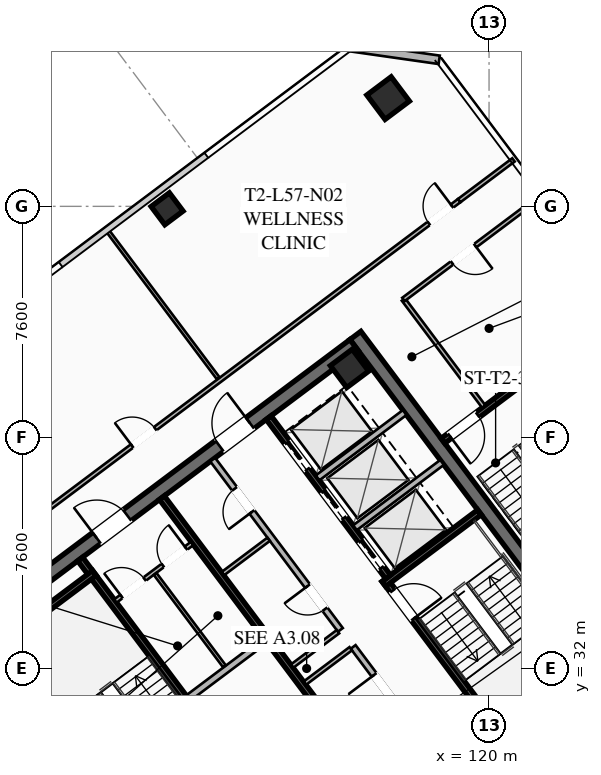
"""IFC4 building model, lengths in metres.
Left out: names, types, materials, properties, quantities, classifications, styles, units other than length and angle.
Written with IfcOpenShell. Run it as: python <this file> out.ifc"""

import sys

from ifc_helpers import new_model, si_unit, direction, frame, frame_2d, origin, origin_2d, place, context, subcontext, project, spatial, rectangle, hollow_rectangle, extrude, element, fill, save


model = new_model("IFC4")
c1 = context("Model", 3, precision=1e-05, world=origin(), true_north=direction((0.0, 1.0)))
c2 = subcontext(c1, "Body", "Model", "MODEL_VIEW")
j1 = project(units=[si_unit("LENGTHUNIT", "METRE"), si_unit("PLANEANGLEUNIT", "RADIAN")], contexts=[c1])
p1 = place(None, origin())
s1 = spatial("IfcSite", under=j1, at=p1, CompositionType="ELEMENT")
p2 = place(p1, origin())
s2 = spatial("IfcBuilding", under=s1, at=p2, CompositionType="ELEMENT")
p3 = place(p2, frame((0.0, 0.0, 211.3)))
s3 = spatial("IfcBuildingStorey", under=s2, at=p3, CompositionType="ELEMENT", Elevation=211.3)
for number, where, z_axis, x_axis in (
    (1, (112.396, 21.047, 0.0), (0.0, 0.0, 1.0), (-0.6, 0.8, 0.0)),
    (2, (115.604, 42.953, 0.0), (0.0, 0.0, 1.0), (0.6, -0.8, 0.0)),
):
    element("IfcWall", number, at=place(p3, frame(where, z_axis=z_axis, x_axis=x_axis)), inside=s3, PredefinedType="SHEAR", context=c2, shape_type="SweptSolid", body=[
        extrude(rectangle(XDim=15.6, YDim=0.45, at=frame_2d((7.8, 0.0))), origin(), (0.0, 0.0, 1.0), 3.55),
    ])
p4 = place(p3, frame((103.351, 33.482, 0.0), z_axis=(0.0, 0.0, 1.0), x_axis=(0.8, 0.6, 0.0)))
e3 = element("IfcWall", 3, at=p4, inside=s3, PredefinedType="SHEAR", context=c2, shape_type="SweptSolid", body=[
    extrude(rectangle(XDim=15.26, YDim=0.45, at=frame_2d((7.63, 0.0))), origin(), (0.0, 0.0, 1.0), 3.55),
])
p5 = place(p4, frame((4.68, 0.0, 0.0)))
e4 = element("IfcOpeningElement", 4, at=p5, cuts=e3, PredefinedType="OPENING", context=c2, shape_type="SweptSolid", body=[
    extrude(rectangle(XDim=1.25, YDim=2.25, at=frame_2d((0.625, 1.125))), frame((0.0, 0.235, 0.0), z_axis=(0.0, -1.0, 0.0), x_axis=(1.0, 0.0, 0.0)), (0.0, 0.0, 1.0), 0.47),
])
p6 = place(p4, frame((9.73, 0.0, 0.0)))
e5 = element("IfcOpeningElement", 5, at=p6, cuts=e3, PredefinedType="OPENING", context=c2, shape_type="SweptSolid", body=[
    extrude(rectangle(XDim=1.25, YDim=2.25, at=frame_2d((0.625, 1.125))), frame((0.0, 0.235, 0.0), z_axis=(0.0, -1.0, 0.0), x_axis=(1.0, 0.0, 0.0)), (0.0, 0.0, 1.0), 0.47),
])
p7 = place(p3, frame((115.41, 41.87, 0.0), z_axis=(0.0, 0.0, 1.0), x_axis=(0.799999996291, 0.600000004945, 0.0)))
e6 = element("IfcColumn", 6, at=p7, inside=s3, PredefinedType="COLUMN", context=c2, shape_type="SweptSolid", body=[
    extrude(hollow_rectangle(XDim=0.9, YDim=0.9, WallThickness=0.04, at=origin_2d()), origin(), (0.0, 0.0, 1.0), 3.37),
])
p8 = place(p3, frame((116.68, 50.76, 0.0), z_axis=(0.0, 0.0, 1.0), x_axis=(0.799999996291, 0.600000004945, 0.0)))
e7 = element("IfcColumn", 7, at=p8, inside=s3, PredefinedType="COLUMN", context=c2, shape_type="SweptSolid", body=[
    extrude(hollow_rectangle(XDim=1.0, YDim=1.0, WallThickness=0.04, at=origin_2d()), origin(), (0.0, 0.0, 1.0), 3.37),
])
p9 = place(p3, frame((109.41, 47.12, 0.0), z_axis=(0.0, 0.0, 1.0), x_axis=(0.799999996291, 0.600000004945, 0.0)))
e8 = element("IfcColumn", 8, at=p9, inside=s3, PredefinedType="COLUMN", context=c2, shape_type="SweptSolid", body=[
    extrude(hollow_rectangle(XDim=0.75, YDim=0.75, WallThickness=0.032, at=origin_2d()), origin(), (0.0, 0.0, 1.0), 3.37),
])
p10 = place(p3, frame((115.42, 52.44, 0.0), z_axis=(0.0, 0.0, 1.0), x_axis=(0.989954425158, -0.14138683146, 0.0)))
e9 = element("IfcWall", 9, at=p10, inside=s3, PredefinedType="SOLIDWALL", context=c2, shape_type="SweptSolid", body=[
    extrude(rectangle(XDim=2.97, YDim=0.28, at=frame_2d((1.485, 0.0))), origin(), (0.0, 0.0, 1.0), 3.37),
])
p11 = place(p3, frame((111.44, 29.08, 0.0), z_axis=(0.0, 0.0, 1.0), x_axis=(-0.59999041401, 0.800007189403, 0.0)))
e10 = element("IfcWall", 10, at=p11, inside=s3, PredefinedType="SHEAR", context=c2, shape_type="SweptSolid", body=[
    extrude(rectangle(XDim=8.15, YDim=0.2, at=frame_2d((4.075, 0.0))), origin(), (0.0, 0.0, 1.0), 3.37),
])
p12 = place(p11, frame((0.45, 0.0, 0.0)))
e11 = element("IfcOpeningElement", 11, at=p12, cuts=e10, PredefinedType="OPENING", context=c2, shape_type="SweptSolid", body=[
    extrude(rectangle(XDim=1.15, YDim=2.2, at=frame_2d((0.575, 1.1))), frame((0.0, 0.11, 0.0), z_axis=(0.0, -1.0, 0.0), x_axis=(1.0, 0.0, 0.0)), (0.0, 0.0, 1.0), 0.22),
])
p13 = place(p3, frame((103.876, 32.782, 0.0), z_axis=(0.0, 0.0, 1.0), x_axis=(0.800014909178, 0.599980120581, 0.0)))
e12 = element("IfcWall", 12, at=p13, inside=s3, PredefinedType="SHEAR", context=c2, shape_type="SweptSolid", body=[
    extrude(rectangle(XDim=3.93, YDim=0.2, at=frame_2d((1.965, 0.0))), origin(), (0.0, 0.0, 1.0), 3.37),
])
p14 = place(p3, frame((116.56, 34.92, 0.0), z_axis=(0.0, 0.0, 1.0), x_axis=(0.59999041401, -0.800007189403, 0.0)))
e13 = element("IfcWall", 13, at=p14, inside=s3, PredefinedType="SHEAR", context=c2, shape_type="SweptSolid", body=[
    extrude(rectangle(XDim=8.15, YDim=0.2, at=frame_2d((4.075, 0.0))), origin(), (0.0, 0.0, 1.0), 3.37),
])
p15 = place(p14, frame((0.45, 0.0, 0.0)))
e14 = element("IfcOpeningElement", 14, at=p15, cuts=e13, PredefinedType="OPENING", context=c2, shape_type="SweptSolid", body=[
    extrude(rectangle(XDim=1.15, YDim=2.2, at=frame_2d((0.575, 1.1))), frame((0.0, 0.11, 0.0), z_axis=(0.0, -1.0, 0.0), x_axis=(1.0, 0.0, 0.0)), (0.0, 0.0, 1.0), 0.22),
])
for number, where, z_axis, x_axis in (
    (15, (116.54, 34.78, 0.0), (0.0, 0.0, 1.0), (0.8, 0.6, 0.0)),
    (16, (120.98, 28.86, 0.0), (0.0, 0.0, 1.0), (0.8, 0.6, 0.0)),
):
    element("IfcWall", number, at=place(p3, frame(where, z_axis=z_axis, x_axis=x_axis)), inside=s3, PredefinedType="SHEAR", context=c2, shape_type="SweptSolid", body=[
        extrude(rectangle(XDim=3.93, YDim=0.2, at=frame_2d((1.965, 0.0))), origin(), (0.0, 0.0, 1.0), 3.37),
    ])
p16 = place(p3, frame((118.058, 25.856, 0.0), z_axis=(0.0, 0.0, 1.0), x_axis=(-0.600002657301, 0.799998007018, 0.0)))
e17 = element("IfcWall", 17, at=p16, inside=s3, PredefinedType="SHEAR", context=c2, shape_type="SweptSolid", body=[
    extrude(rectangle(XDim=14.7, YDim=0.2, at=frame_2d((7.35, 0.0))), origin(), (0.0, 0.0, 1.0), 3.37),
])
p17 = place(p3, frame((110.104, 31.028, 0.0), z_axis=(0.0, 0.0, 1.0), x_axis=(0.800018601094, 0.59997519774, 0.0)))
e18 = element("IfcWall", 18, at=p17, inside=s3, PredefinedType="SOLIDWALL", context=c2, shape_type="SweptSolid", body=[
    extrude(rectangle(XDim=3.15, YDim=0.22, at=frame_2d((1.575, 0.0))), origin(), (0.0, 0.0, 1.0), 2.723),
])
p18 = place(p3, frame((112.75, 40.25, 0.0), z_axis=(0.0, 0.0, 1.0), x_axis=(0.599994036198, -0.800004472816, 0.0)))
e19 = element("IfcWall", 19, at=p18, inside=s3, PredefinedType="SHEAR", context=c2, shape_type="SweptSolid", body=[
    extrude(rectangle(XDim=6.55, YDim=0.2, at=frame_2d((3.275, 0.0))), origin(), (0.0, 0.0, 1.0), 3.37),
])
p19 = place(p18, frame((5.075, 0.0, 0.0)))
e20 = element("IfcOpeningElement", 20, at=p19, cuts=e19, PredefinedType="OPENING", context=c2, shape_type="SweptSolid", body=[
    extrude(rectangle(XDim=1.1, YDim=2.2, at=frame_2d((0.55, 1.1))), frame((0.0, 0.11, 0.0), z_axis=(0.0, -1.0, 0.0), x_axis=(1.0, 0.0, 0.0)), (0.0, 0.0, 1.0), 0.22),
])
p20 = place(p18, frame((3.025, 0.0, 0.0)))
e21 = element("IfcOpeningElement", 21, at=p20, cuts=e19, PredefinedType="OPENING", context=c2, shape_type="SweptSolid", body=[
    extrude(rectangle(XDim=1.1, YDim=2.2, at=frame_2d((0.55, 1.1))), frame((0.0, 0.11, 0.0), z_axis=(0.0, -1.0, 0.0), x_axis=(1.0, 0.0, 0.0)), (0.0, 0.0, 1.0), 0.22),
])
p21 = place(p18, frame((1.025, 0.0, 0.0)))
e22 = element("IfcOpeningElement", 22, at=p21, cuts=e19, PredefinedType="OPENING", context=c2, shape_type="SweptSolid", body=[
    extrude(rectangle(XDim=1.1, YDim=2.2, at=frame_2d((0.55, 1.1))), frame((0.0, 0.11, 0.0), z_axis=(0.0, -1.0, 0.0), x_axis=(1.0, 0.0, 0.0)), (0.0, 0.0, 1.0), 0.22),
])
for number, where, z_axis, x_axis in (
    (23, (115.59, 36.63, 0.0), (0.0, 0.0, 1.0), (0.8, 0.6, 0.0)),
    (24, (114.36, 38.27, 0.0), (0.0, 0.0, 1.0), (0.8, 0.6, 0.0)),
):
    element("IfcWall", number, at=place(p3, frame(where, z_axis=z_axis, x_axis=x_axis)), inside=s3, PredefinedType="SOLIDWALL", context=c2, shape_type="SweptSolid", body=[
        extrude(rectangle(XDim=3.58, YDim=0.2, at=frame_2d((1.79, 0.0))), origin(), (0.0, 0.0, 1.0), 3.37),
    ])
p22 = place(p3, frame((107.71, 34.22, 0.0), z_axis=(0.0, 0.0, 1.0), x_axis=(0.799981399002, 0.60002480053, 0.0)))
e25 = element("IfcWall", 25, at=p22, inside=s3, PredefinedType="PARTITIONING", context=c2, shape_type="SweptSolid", body=[
    extrude(rectangle(XDim=3.15, YDim=0.135, at=frame_2d((1.575, 0.0))), origin(), (0.0, 0.0, 1.0), 2.723),
])
p23 = place(p22, frame((0.25, 0.0, 0.0)))
e26 = element("IfcOpeningElement", 26, at=p23, cuts=e25, PredefinedType="OPENING", context=c2, shape_type="SweptSolid", body=[
    extrude(rectangle(XDim=0.95, YDim=2.05, at=frame_2d((0.475, 1.025))), frame((0.0, 0.077, 0.0), z_axis=(0.0, -1.0, 0.0), x_axis=(1.0, 0.0, 0.0)), (0.0, 0.0, 1.0), 0.155),
])
p24 = place(p22, frame((1.95, 0.0, 0.0)))
e27 = element("IfcOpeningElement", 27, at=p24, cuts=e25, PredefinedType="OPENING", context=c2, shape_type="SweptSolid", body=[
    extrude(rectangle(XDim=0.95, YDim=2.05, at=frame_2d((0.475, 1.025))), frame((0.0, 0.077, 0.0), z_axis=(0.0, -1.0, 0.0), x_axis=(1.0, 0.0, 0.0)), (0.0, 0.0, 1.0), 0.155),
])
p25 = place(p3, frame((111.296, 32.072, 0.0), z_axis=(0.0, 0.0, 1.0), x_axis=(-0.59995887973, 0.800030838552, 0.0)))
e28 = element("IfcWall", 28, at=p25, inside=s3, PredefinedType="PARTITIONING", context=c2, shape_type="SweptSolid", body=[
    extrude(rectangle(XDim=3.8, YDim=0.11, at=frame_2d((1.9, 0.0))), origin(), (0.0, 0.0, 1.0), 2.723),
])
p26 = place(p3, frame((119.73, 27.11, 0.0), z_axis=(0.0, 0.0, 1.0), x_axis=(-0.600005580459, 0.799995814625, 0.0)))
e29 = element("IfcWall", 29, at=p26, inside=s3, PredefinedType="SOLIDWALL", context=c2, shape_type="SweptSolid", body=[
    extrude(rectangle(XDim=7.0, YDim=0.2, at=frame_2d((3.5, 0.0))), origin(), (0.0, 0.0, 1.0), 2.723),
])
p27 = place(p26, frame((0.85, 0.0, 0.0)))
e30 = element("IfcOpeningElement", 30, at=p27, cuts=e29, PredefinedType="OPENING", context=c2, shape_type="SweptSolid", body=[
    extrude(rectangle(XDim=0.95, YDim=2.05, at=frame_2d((0.475, 1.025))), frame((0.0, 0.11, 0.0), z_axis=(0.0, -1.0, 0.0), x_axis=(1.0, 0.0, 0.0)), (0.0, 0.0, 1.0), 0.22),
])
p28 = place(p26, frame((4.8, 0.0, 0.0)))
e31 = element("IfcOpeningElement", 31, at=p28, cuts=e29, PredefinedType="OPENING", context=c2, shape_type="SweptSolid", body=[
    extrude(rectangle(XDim=1.05, YDim=2.2, at=frame_2d((0.525, 1.1))), frame((0.0, 0.11, 0.0), z_axis=(0.0, -1.0, 0.0), x_axis=(1.0, 0.0, 0.0)), (0.0, 0.0, 1.0), 0.22),
])
p29 = place(p3, frame((113.946, 31.522, 0.0), z_axis=(0.0, 0.0, 1.0), x_axis=(0.8, 0.6, 0.0)))
e32 = element("IfcWall", 32, at=p29, inside=s3, PredefinedType="PARTITIONING", context=c2, shape_type="SweptSolid", body=[
    extrude(rectangle(XDim=1.88, YDim=0.135, at=frame_2d((0.94, 0.0))), origin(), (0.0, 0.0, 1.0), 2.723),
])
p30 = place(p3, frame((115.11, 33.27, 0.0), z_axis=(0.0, 0.0, 1.0), x_axis=(-0.600011160345, 0.79999162962, 0.0)))
e33 = element("IfcWall", 33, at=p30, inside=s3, PredefinedType="SOLIDWALL", context=c2, shape_type="SweptSolid", body=[
    extrude(rectangle(XDim=7.0, YDim=0.2, at=frame_2d((3.5, 0.0))), origin(), (0.0, 0.0, 1.0), 2.723),
])
p31 = place(p30, frame((0.85, 0.0, 0.0)))
e34 = element("IfcOpeningElement", 34, at=p31, cuts=e33, PredefinedType="OPENING", context=c2, shape_type="SweptSolid", body=[
    extrude(rectangle(XDim=0.95, YDim=2.05, at=frame_2d((0.475, 1.025))), frame((0.0, 0.11, 0.0), z_axis=(0.0, -1.0, 0.0), x_axis=(1.0, 0.0, 0.0)), (0.0, 0.0, 1.0), 0.22),
])
p32 = place(p30, frame((4.85, 0.0, 0.0)))
e35 = element("IfcOpeningElement", 35, at=p32, cuts=e33, PredefinedType="OPENING", context=c2, shape_type="SweptSolid", body=[
    extrude(rectangle(XDim=0.95, YDim=2.05, at=frame_2d((0.475, 1.025))), frame((0.0, 0.11, 0.0), z_axis=(0.0, -1.0, 0.0), x_axis=(1.0, 0.0, 0.0)), (0.0, 0.0, 1.0), 0.22),
])
p33 = place(p3, frame((113.526, 32.082, 0.0), z_axis=(0.0, 0.0, 1.0), x_axis=(0.800046745961, 0.599937666993, 0.0)))
e36 = element("IfcWall", 36, at=p33, inside=s3, PredefinedType="PARTITIONING", context=c2, shape_type="SweptSolid", body=[
    extrude(rectangle(XDim=1.88, YDim=0.135, at=frame_2d((0.94, 0.0))), origin(), (0.0, 0.0, 1.0), 2.723),
])
p34 = place(p3, frame((111.246, 35.122, 0.0), z_axis=(0.0, 0.0, 1.0), x_axis=(0.8, 0.6, 0.0)))
e37 = element("IfcWall", 37, at=p34, inside=s3, PredefinedType="PARTITIONING", context=c2, shape_type="SweptSolid", body=[
    extrude(rectangle(XDim=1.88, YDim=0.135, at=frame_2d((0.94, 0.0))), origin(), (0.0, 0.0, 1.0), 2.723),
])
p35 = place(p3, frame((121.204, 41.528, 0.0), z_axis=(0.0, 0.0, 1.0), x_axis=(-0.800017232136, -0.599977023131, 0.0)))
e38 = element("IfcWall", 38, at=p35, inside=s3, PredefinedType="SHEAR", context=c2, shape_type="SweptSolid", body=[
    extrude(rectangle(XDim=3.4, YDim=0.2, at=frame_2d((1.7, 0.0))), origin(), (0.0, 0.0, 1.0), 3.37),
])
p36 = place(p35, frame((1.975, 0.0, 0.0)))
e39 = element("IfcOpeningElement", 39, at=p36, cuts=e38, PredefinedType="OPENING", context=c2, shape_type="SweptSolid", body=[
    extrude(rectangle(XDim=1.15, YDim=2.2, at=frame_2d((0.575, 1.1))), frame((0.0, 0.11, 0.0), z_axis=(0.0, -1.0, 0.0), x_axis=(1.0, 0.0, 0.0)), (0.0, 0.0, 1.0), 0.22),
])
p37 = place(p3, frame((119.824, 40.618, 0.0), z_axis=(0.0, 0.0, 1.0), x_axis=(-0.599982243973, 0.800013316712, 0.0)))
e40 = element("IfcWall", 40, at=p37, inside=s3, PredefinedType="PARTITIONING", context=c2, shape_type="SweptSolid", body=[
    extrude(rectangle(XDim=4.4, YDim=0.135, at=frame_2d((2.2, 0.0))), origin(), (0.0, 0.0, 1.0), 2.723),
])
p38 = place(p3, frame((100.756, 33.692, 0.0), z_axis=(0.0, 0.0, 1.0), x_axis=(0.799998716732, 0.60000171102, 0.0)))
e41 = element("IfcWall", 41, at=p38, inside=s3, PredefinedType="PARTITIONING", context=c2, shape_type="SweptSolid", body=[
    extrude(rectangle(XDim=22.83, YDim=0.135, at=frame_2d((11.415, 0.0))), origin(), (0.0, 0.0, 1.0), 2.723),
])
p39 = place(p38, frame((9.38, 0.0, 0.0)))
e42 = element("IfcOpeningElement", 42, at=p39, cuts=e41, PredefinedType="OPENING", context=c2, shape_type="SweptSolid", body=[
    extrude(rectangle(XDim=0.95, YDim=2.05, at=frame_2d((0.475, 1.025))), frame((0.0, 0.077, 0.0), z_axis=(0.0, -1.0, 0.0), x_axis=(1.0, 0.0, 0.0)), (0.0, 0.0, 1.0), 0.155),
])
p40 = place(p38, frame((21.58, 0.0, 0.0)))
e43 = element("IfcOpeningElement", 43, at=p40, cuts=e41, PredefinedType="OPENING", context=c2, shape_type="SweptSolid", body=[
    extrude(rectangle(XDim=0.95, YDim=2.05, at=frame_2d((0.475, 1.025))), frame((0.0, 0.077, 0.0), z_axis=(0.0, -1.0, 0.0), x_axis=(1.0, 0.0, 0.0)), (0.0, 0.0, 1.0), 0.155),
])
p41 = place(p3, frame((119.02, 47.39, 0.0), z_axis=(0.0, 0.0, 1.0), x_axis=(0.799960585956, 0.600052548463, 0.0)))
e44 = element("IfcWall", 44, at=p41, inside=s3, PredefinedType="PARTITIONING", context=c2, shape_type="SweptSolid", body=[
    extrude(rectangle(XDim=2.23, YDim=0.135, at=frame_2d((1.115, 0.0))), origin(), (0.0, 0.0, 1.0), 2.723),
])
p42 = place(p3, frame((111.092, 41.544, 0.0), z_axis=(0.0, 0.0, 1.0), x_axis=(-0.600006403464, 0.799995197362, 0.0)))
e45 = element("IfcWall", 45, at=p42, inside=s3, PredefinedType="PARTITIONING", context=c2, shape_type="SweptSolid", body=[
    extrude(rectangle(XDim=6.1, YDim=0.11, at=frame_2d((3.05, 0.0))), origin(), (0.0, 0.0, 1.0), 2.723),
])
p43 = place(p3, frame((121.704, 47.528, 0.0), z_axis=(0.0, 0.0, 1.0), x_axis=(-0.799989629485, -0.600013827105, 0.0)))
e46 = element("IfcWall", 46, at=p43, inside=s3, PredefinedType="PARTITIONING", context=c2, shape_type="SweptSolid", body=[
    extrude(rectangle(XDim=5.65, YDim=0.135, at=frame_2d((2.825, 0.0))), origin(), (0.0, 0.0, 1.0), 2.723),
])
p44 = place(p43, frame((2.7, 0.0, 0.0)))
e47 = element("IfcOpeningElement", 47, at=p44, cuts=e46, PredefinedType="OPENING", context=c2, shape_type="SweptSolid", body=[
    extrude(rectangle(XDim=0.95, YDim=2.05, at=frame_2d((0.475, 1.025))), frame((0.0, 0.077, 0.0), z_axis=(0.0, -1.0, 0.0), x_axis=(1.0, 0.0, 0.0)), (0.0, 0.0, 1.0), 0.155),
])
p45 = place(p3, frame((113.23, 17.06, 0.0), z_axis=(0.0, 0.0, 1.0), x_axis=(-0.600003772342, 0.79999717073, 0.0)))
e48 = element("IfcWall", 48, at=p45, inside=s3, PredefinedType="PARTITIONING", context=c2, shape_type="SweptSolid", body=[
    extrude(rectangle(XDim=20.71, YDim=0.135, at=frame_2d((10.355, 0.0))), origin(), (0.0, 0.0, 1.0), 2.723),
])
p46 = place(p45, frame((0.3, 0.0, 0.0)))
e49 = element("IfcOpeningElement", 49, at=p46, cuts=e48, PredefinedType="OPENING", context=c2, shape_type="SweptSolid", body=[
    extrude(rectangle(XDim=0.95, YDim=2.05, at=frame_2d((0.475, 1.025))), frame((0.0, 0.077, 0.0), z_axis=(0.0, -1.0, 0.0), x_axis=(1.0, 0.0, 0.0)), (0.0, 0.0, 1.0), 0.155),
])
p47 = place(p45, frame((11.272, 0.0, 0.0)))
e50 = element("IfcOpeningElement", 50, at=p47, cuts=e48, PredefinedType="OPENING", context=c2, shape_type="SweptSolid", body=[
    extrude(rectangle(XDim=0.95, YDim=2.05, at=frame_2d((0.475, 1.025))), frame((0.0, 0.077, 0.0), z_axis=(0.0, -1.0, 0.0), x_axis=(1.0, 0.0, 0.0)), (0.0, 0.0, 1.0), 0.155),
])
p48 = place(p45, frame((19.46, 0.0, 0.0)))
e51 = element("IfcOpeningElement", 51, at=p48, cuts=e48, PredefinedType="OPENING", context=c2, shape_type="SweptSolid", body=[
    extrude(rectangle(XDim=0.95, YDim=2.05, at=frame_2d((0.475, 1.025))), frame((0.0, 0.077, 0.0), z_axis=(0.0, -1.0, 0.0), x_axis=(1.0, 0.0, 0.0)), (0.0, 0.0, 1.0), 0.155),
])
p49 = place(p5, origin())
e52 = element("IfcDoor", 52, at=p49, inside=s3, OperationType="SINGLE_SWING_LEFT", PredefinedType="DOOR", context=c2, shape_type="SweptSolid", body=[
    extrude(rectangle(XDim=1.25, YDim=2.25, at=frame_2d((0.625, 1.125))), frame((0.0, 0.025, 0.0), z_axis=(0.0, -1.0, 0.0), x_axis=(1.0, 0.0, 0.0)), (0.0, 0.0, 1.0), 0.05),
])
fill(e4, e52)
p50 = place(p6, origin())
e53 = element("IfcDoor", 53, at=p50, inside=s3, OperationType="SINGLE_SWING_RIGHT", PredefinedType="DOOR", context=c2, shape_type="SweptSolid", body=[
    extrude(rectangle(XDim=1.25, YDim=2.25, at=frame_2d((0.625, 1.125))), frame((0.0, 0.025, 0.0), z_axis=(0.0, -1.0, 0.0), x_axis=(1.0, 0.0, 0.0)), (0.0, 0.0, 1.0), 0.05),
])
fill(e5, e53)
p51 = place(p15, origin())
e54 = element("IfcDoor", 54, at=p51, inside=s3, OperationType="SINGLE_SWING_RIGHT", PredefinedType="DOOR", context=c2, shape_type="SweptSolid", body=[
    extrude(rectangle(XDim=1.15, YDim=2.2, at=frame_2d((0.575, 1.1))), frame((0.0, 0.025, 0.0), z_axis=(0.0, -1.0, 0.0), x_axis=(1.0, 0.0, 0.0)), (0.0, 0.0, 1.0), 0.05),
])
fill(e14, e54)
p52 = place(p23, origin())
e55 = element("IfcDoor", 55, at=p52, inside=s3, OperationType="SINGLE_SWING_LEFT", PredefinedType="DOOR", context=c2, shape_type="SweptSolid", body=[
    extrude(rectangle(XDim=0.95, YDim=2.05, at=frame_2d((0.475, 1.025))), frame((0.0, 0.025, 0.0), z_axis=(0.0, -1.0, 0.0), x_axis=(1.0, 0.0, 0.0)), (0.0, 0.0, 1.0), 0.05),
])
fill(e26, e55)
p53 = place(p24, origin())
e56 = element("IfcDoor", 56, at=p53, inside=s3, OperationType="SINGLE_SWING_RIGHT", PredefinedType="DOOR", context=c2, shape_type="SweptSolid", body=[
    extrude(rectangle(XDim=0.95, YDim=2.05, at=frame_2d((0.475, 1.025))), frame((0.0, 0.025, 0.0), z_axis=(0.0, -1.0, 0.0), x_axis=(1.0, 0.0, 0.0)), (0.0, 0.0, 1.0), 0.05),
])
fill(e27, e56)
p54 = place(p28, origin())
e57 = element("IfcDoor", 57, at=p54, inside=s3, OperationType="SINGLE_SWING_RIGHT", PredefinedType="DOOR", context=c2, shape_type="SweptSolid", body=[
    extrude(rectangle(XDim=1.05, YDim=2.2, at=frame_2d((0.525, 1.1))), frame((0.0, 0.025, 0.0), z_axis=(0.0, -1.0, 0.0), x_axis=(1.0, 0.0, 0.0)), (0.0, 0.0, 1.0), 0.05),
])
fill(e31, e57)
p55 = place(p31, origin())
e58 = element("IfcDoor", 58, at=p55, inside=s3, OperationType="SINGLE_SWING_RIGHT", PredefinedType="DOOR", context=c2, shape_type="SweptSolid", body=[
    extrude(rectangle(XDim=0.95, YDim=2.05, at=frame_2d((0.475, 1.025))), frame((0.0, 0.025, 0.0), z_axis=(0.0, -1.0, 0.0), x_axis=(1.0, 0.0, 0.0)), (0.0, 0.0, 1.0), 0.05),
])
fill(e34, e58)
p56 = place(p32, origin())
e59 = element("IfcDoor", 59, at=p56, inside=s3, OperationType="SINGLE_SWING_LEFT", PredefinedType="DOOR", context=c2, shape_type="SweptSolid", body=[
    extrude(rectangle(XDim=0.95, YDim=2.05, at=frame_2d((0.475, 1.025))), frame((0.0, 0.025, 0.0), z_axis=(0.0, -1.0, 0.0), x_axis=(1.0, 0.0, 0.0)), (0.0, 0.0, 1.0), 0.05),
])
fill(e35, e59)
p57 = place(p36, origin())
e60 = element("IfcDoor", 60, at=p57, inside=s3, OperationType="SINGLE_SWING_RIGHT", PredefinedType="DOOR", context=c2, shape_type="SweptSolid", body=[
    extrude(rectangle(XDim=1.15, YDim=2.2, at=frame_2d((0.575, 1.1))), frame((0.0, 0.025, 0.0), z_axis=(0.0, -1.0, 0.0), x_axis=(1.0, 0.0, 0.0)), (0.0, 0.0, 1.0), 0.05),
])
fill(e39, e60)
p58 = place(p39, origin())
e61 = element("IfcDoor", 61, at=p58, inside=s3, OperationType="SINGLE_SWING_LEFT", PredefinedType="DOOR", context=c2, shape_type="SweptSolid", body=[
    extrude(rectangle(XDim=0.95, YDim=2.05, at=frame_2d((0.475, 1.025))), frame((0.0, 0.025, 0.0), z_axis=(0.0, -1.0, 0.0), x_axis=(1.0, 0.0, 0.0)), (0.0, 0.0, 1.0), 0.05),
])
fill(e42, e61)
p59 = place(p40, origin())
e62 = element("IfcDoor", 62, at=p59, inside=s3, OperationType="SINGLE_SWING_RIGHT", PredefinedType="DOOR", context=c2, shape_type="SweptSolid", body=[
    extrude(rectangle(XDim=0.95, YDim=2.05, at=frame_2d((0.475, 1.025))), frame((0.0, 0.025, 0.0), z_axis=(0.0, -1.0, 0.0), x_axis=(1.0, 0.0, 0.0)), (0.0, 0.0, 1.0), 0.05),
])
fill(e43, e62)
p60 = place(p44, origin())
e63 = element("IfcDoor", 63, at=p60, inside=s3, OperationType="SINGLE_SWING_LEFT", PredefinedType="DOOR", context=c2, shape_type="SweptSolid", body=[
    extrude(rectangle(XDim=0.95, YDim=2.05, at=frame_2d((0.475, 1.025))), frame((0.0, 0.025, 0.0), z_axis=(0.0, -1.0, 0.0), x_axis=(1.0, 0.0, 0.0)), (0.0, 0.0, 1.0), 0.05),
])
fill(e47, e63)
p61 = place(p19, origin())
e64 = element("IfcDoor", 64, at=p61, inside=s3, OperationType="SLIDING_TO_LEFT", PredefinedType="DOOR", context=c2, shape_type="SweptSolid", body=[
    extrude(rectangle(XDim=1.1, YDim=2.2, at=frame_2d((0.55, 1.1))), frame((0.0, 0.025, 0.0), z_axis=(0.0, -1.0, 0.0), x_axis=(1.0, 0.0, 0.0)), (0.0, 0.0, 1.0), 0.05),
])
fill(e20, e64)
p62 = place(p20, origin())
e65 = element("IfcDoor", 65, at=p62, inside=s3, OperationType="SLIDING_TO_LEFT", PredefinedType="DOOR", context=c2, shape_type="SweptSolid", body=[
    extrude(rectangle(XDim=1.1, YDim=2.2, at=frame_2d((0.55, 1.1))), frame((0.0, 0.025, 0.0), z_axis=(0.0, -1.0, 0.0), x_axis=(1.0, 0.0, 0.0)), (0.0, 0.0, 1.0), 0.05),
])
fill(e21, e65)
p63 = place(p21, origin())
e66 = element("IfcDoor", 66, at=p63, inside=s3, OperationType="SLIDING_TO_LEFT", PredefinedType="DOOR", context=c2, shape_type="SweptSolid", body=[
    extrude(rectangle(XDim=1.1, YDim=2.2, at=frame_2d((0.55, 1.1))), frame((0.0, 0.025, 0.0), z_axis=(0.0, -1.0, 0.0), x_axis=(1.0, 0.0, 0.0)), (0.0, 0.0, 1.0), 0.05),
])
fill(e22, e66)
save(model, sys.argv[1])
